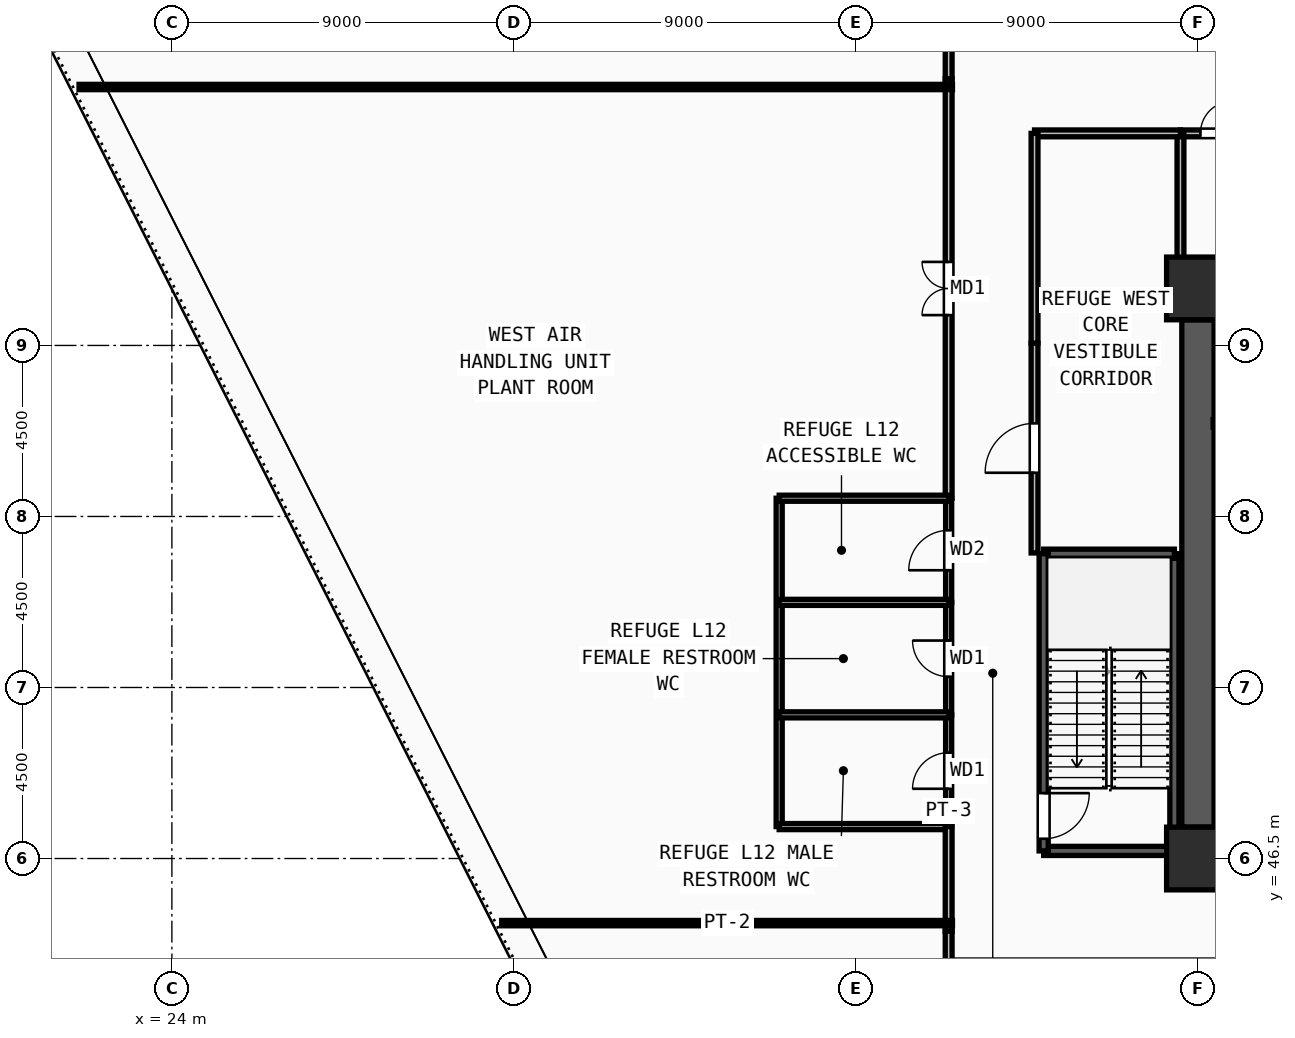
"""IFC4 building model, lengths in metres.
Left out: names, types, materials, properties, quantities, classifications, styles, units other than length and angle.
Written with IfcOpenShell. Run it as: python <this file> out.ifc"""

import sys

from ifc_helpers import new_model, si_unit, direction, frame, frame_2d, origin, origin_2d, place, context, subcontext, project, spatial, rectangle, extrude, source, transform, mapped, element, fill, save


model = new_model("IFC4")
c1 = context("Model", 3, precision=1e-05, world=origin(), true_north=direction((0.0, 1.0)))
c2 = subcontext(c1, "Body", "Model", "MODEL_VIEW")
j1 = project(units=[si_unit("LENGTHUNIT", "METRE"), si_unit("PLANEANGLEUNIT", "RADIAN")], contexts=[c1])
p1 = place(None, origin())
s1 = spatial("IfcSite", under=j1, at=p1, CompositionType="ELEMENT")
p2 = place(p1, origin())
s2 = spatial("IfcBuilding", under=s1, at=p2, CompositionType="ELEMENT")
p3 = place(p2, frame((0.0, 0.0, 47.25)))
s3 = spatial("IfcBuildingStorey", under=s2, at=p3, CompositionType="ELEMENT", Elevation=47.25)
m1 = source(origin(), c2, "Body", "SweptSolid", [
    extrude(rectangle(XDim=1.65, YDim=1.65, at=origin_2d()), origin(), (0.0, 0.0, 1.0), 4.5),
])
for number, where, z_axis, x_axis in (
    (1, (51.0, 46.5, 0.0), (0.0, 0.0, 1.0), (1.0, 0.0, 0.0)),
    (2, (51.0, 61.5, 0.0), (0.0, 0.0, 1.0), (1.0, 0.0, 0.0)),
):
    element("IfcColumn", number, at=place(p3, frame(where, z_axis=z_axis, x_axis=x_axis)), inside=s3, PredefinedType="COLUMN", context=c2, shape_type="MappedRepresentation", body=[
        mapped(m1, transform((0.0, 0.0, 0.0), x_axis=(1.0, 0.0, 0.0), y_axis=(0.0, 1.0, 0.0), z_axis=(0.0, 0.0, 1.0), scale=1.0)),
    ])
p4 = place(p3, frame((51.0, 47.325, 0.0), z_axis=(0.0, 0.0, 1.0), x_axis=(0.0, 1.0, 0.0)))
e3 = element("IfcWall", 3, at=p4, inside=s3, PredefinedType="SHEAR", context=c2, shape_type="SweptSolid", body=[
    extrude(rectangle(XDim=13.35, YDim=0.85, at=frame_2d((6.675, 0.0))), origin(), (0.0, 0.0, 1.0), 4.32),
])
p5 = place(p3, frame((46.94, 46.7, 0.0), z_axis=(0.0, 0.0, 1.0), x_axis=(1.0, 0.0, 0.0)))
e4 = element("IfcWall", 4, at=p5, inside=s3, PredefinedType="SOLIDWALL", context=c2, shape_type="SweptSolid", body=[
    extrude(rectangle(XDim=3.44, YDim=0.24, at=frame_2d((1.72, 0.0))), origin(), (0.0, 0.0, 1.0), 4.32),
])
p6 = place(p3, frame((50.38, 46.7, 0.0), z_axis=(0.0, 0.0, 1.0), x_axis=(0.0, 1.0, 0.0)))
e5 = element("IfcWall", 5, at=p6, inside=s3, PredefinedType="SOLIDWALL", context=c2, shape_type="SweptSolid", body=[
    extrude(rectangle(XDim=7.82, YDim=0.24, at=frame_2d((3.91, 0.0))), origin(), (0.0, 0.0, 1.0), 4.32),
])
p7 = place(p3, frame((50.38, 54.52, 0.0), z_axis=(0.0, 0.0, 1.0), x_axis=(-1.0, 0.0, 0.0)))
e6 = element("IfcWall", 6, at=p7, inside=s3, PredefinedType="SOLIDWALL", context=c2, shape_type="SweptSolid", body=[
    extrude(rectangle(XDim=3.44, YDim=0.24, at=frame_2d((1.72, 0.0))), origin(), (0.0, 0.0, 1.0), 4.32),
])
p8 = place(p3, frame((46.94, 54.52, 0.0), z_axis=(0.0, 0.0, 1.0), x_axis=(0.0, -1.0, 0.0)))
e7 = element("IfcWall", 7, at=p8, inside=s3, PredefinedType="SOLIDWALL", context=c2, shape_type="SweptSolid", body=[
    extrude(rectangle(XDim=7.82, YDim=0.24, at=frame_2d((3.91, 0.0))), origin(), (0.0, 0.0, 1.0), 4.32),
])
m2 = source(origin(), c2, "Body", "SweptSolid", [
    extrude(rectangle(XDim=1.2, YDim=2.2, at=frame_2d((0.6, 1.1))), frame((0.0, 0.13, 0.0), z_axis=(0.0, -1.0, 0.0), x_axis=(1.0, 0.0, 0.0)), (0.0, 0.0, 1.0), 0.26),
])
p9 = place(p8, frame((6.3, 0.0, 0.0)))
e8 = element("IfcOpeningElement", 8, at=p9, cuts=e7, PredefinedType="OPENING", context=c2, shape_type="MappedRepresentation", body=[
    mapped(m2, transform((0.0, 0.0, 0.0), x_axis=(1.0, 0.0, 0.0), y_axis=(0.0, 1.0, 0.0), z_axis=(0.0, 0.0, 1.0), scale=1.0)),
])
for number, where, z_axis, x_axis in (
    (9, (51.4, 57.95, 0.0), (0.0, 0.0, 1.0), (1.0, 0.0, 0.0)),
    (10, (53.8, 60.88, 0.0), (0.0, 0.0, 1.0), (-1.0, 0.0, 0.0)),
):
    element("IfcWall", number, at=place(p3, frame(where, z_axis=z_axis, x_axis=x_axis)), inside=s3, PredefinedType="SOLIDWALL", context=c2, shape_type="SweptSolid", body=[
        extrude(rectangle(XDim=2.4, YDim=0.2, at=frame_2d((1.2, 0.0))), origin(), (0.0, 0.0, 1.0), 4.32),
    ])
p10 = place(p3, frame((44.44, 47.34, 0.0), z_axis=(0.0, 0.0, 1.0), x_axis=(0.0, 1.0, 0.0)))
e11 = element("IfcWall", 11, at=p10, inside=s3, PredefinedType="PARTITIONING", context=c2, shape_type="SweptSolid", body=[
    extrude(rectangle(XDim=2.94, YDim=0.16, at=frame_2d((1.47, 0.0))), origin(), (0.0, 0.0, 1.0), 4.32),
])
m3 = source(origin(), c2, "Body", "SweptSolid", [
    extrude(rectangle(XDim=0.95, YDim=2.15, at=frame_2d((0.475, 1.075))), frame((0.0, 0.09, 0.0), z_axis=(0.0, -1.0, 0.0), x_axis=(1.0, 0.0, 0.0)), (0.0, 0.0, 1.0), 0.18),
])
p11 = place(p10, frame((0.995, 0.0, 0.0)))
e12 = element("IfcOpeningElement", 12, at=p11, cuts=e11, PredefinedType="OPENING", context=c2, shape_type="MappedRepresentation", body=[
    mapped(m3, transform((0.0, 0.0, 0.0), x_axis=(1.0, 0.0, 0.0), y_axis=(0.0, 1.0, 0.0), z_axis=(0.0, 0.0, 1.0), scale=1.0)),
])
p12 = place(p3, frame((44.44, 50.28, 0.0), z_axis=(0.0, 0.0, 1.0), x_axis=(0.0, 1.0, 0.0)))
e13 = element("IfcWall", 13, at=p12, inside=s3, PredefinedType="PARTITIONING", context=c2, shape_type="SweptSolid", body=[
    extrude(rectangle(XDim=2.96, YDim=0.16, at=frame_2d((1.48, 0.0))), origin(), (0.0, 0.0, 1.0), 4.32),
])
p13 = place(p12, frame((1.005, 0.0, 0.0)))
e14 = element("IfcOpeningElement", 14, at=p13, cuts=e13, PredefinedType="OPENING", context=c2, shape_type="MappedRepresentation", body=[
    mapped(m3, transform((0.0, 0.0, 0.0), x_axis=(1.0, 0.0, 0.0), y_axis=(0.0, 1.0, 0.0), z_axis=(0.0, 0.0, 1.0), scale=1.0)),
])
p14 = place(p3, frame((44.44, 53.24, 0.0), z_axis=(0.0, 0.0, 1.0), x_axis=(0.0, 1.0, 0.0)))
e15 = element("IfcWall", 15, at=p14, inside=s3, PredefinedType="PARTITIONING", context=c2, shape_type="SweptSolid", body=[
    extrude(rectangle(XDim=2.74, YDim=0.16, at=frame_2d((1.37, 0.0))), origin(), (0.0, 0.0, 1.0), 4.32),
])
m4 = source(origin(), c2, "Body", "SweptSolid", [
    extrude(rectangle(XDim=1.05, YDim=2.15, at=frame_2d((0.525, 1.075))), frame((0.0, 0.09, 0.0), z_axis=(0.0, -1.0, 0.0), x_axis=(1.0, 0.0, 0.0)), (0.0, 0.0, 1.0), 0.18),
])
p15 = place(p14, frame((0.845, 0.0, 0.0)))
e16 = element("IfcOpeningElement", 16, at=p15, cuts=e15, PredefinedType="OPENING", context=c2, shape_type="MappedRepresentation", body=[
    mapped(m4, transform((0.0, 0.0, 0.0), x_axis=(1.0, 0.0, 0.0), y_axis=(0.0, 1.0, 0.0), z_axis=(0.0, 0.0, 1.0), scale=1.0)),
])
p16 = place(p3, frame((50.54, 65.58, 0.0), z_axis=(0.0, 0.0, 1.0), x_axis=(1.0, 0.0, 0.0)))
e17 = element("IfcWall", 17, at=p16, inside=s3, PredefinedType="PARTITIONING", context=c2, shape_type="SweptSolid", body=[
    extrude(rectangle(XDim=1.9, YDim=0.18, at=frame_2d((0.95, 0.0))), origin(), (0.0, 0.0, 1.0), 4.32),
])
m5 = source(origin(), c2, "Body", "SweptSolid", [
    extrude(rectangle(XDim=0.85, YDim=2.1, at=frame_2d((0.425, 1.05))), frame((0.0, 0.1, 0.0), z_axis=(0.0, -1.0, 0.0), x_axis=(1.0, 0.0, 0.0)), (0.0, 0.0, 1.0), 0.2),
])
p17 = place(p16, frame((0.525, 0.0, 0.0)))
e18 = element("IfcOpeningElement", 18, at=p17, cuts=e17, PredefinedType="OPENING", context=c2, shape_type="MappedRepresentation", body=[
    mapped(m5, transform((0.0, 0.0, 0.0), x_axis=(1.0, 0.0, 0.0), y_axis=(0.0, 1.0, 0.0), z_axis=(0.0, 0.0, 1.0), scale=1.0)),
])
p18 = place(p3, frame((46.7, 54.54, 0.0), z_axis=(0.0, 0.0, 1.0), x_axis=(0.0, 1.0, 0.0)))
e19 = element("IfcWall", 19, at=p18, inside=s3, PredefinedType="PARTITIONING", context=c2, shape_type="SweptSolid", body=[
    extrude(rectangle(XDim=5.52, YDim=0.18, at=frame_2d((2.76, 0.0))), origin(), (0.0, 0.0, 1.0), 4.32),
])
m6 = source(origin(), c2, "Body", "SweptSolid", [
    extrude(rectangle(XDim=1.3, YDim=2.2, at=frame_2d((0.65, 1.1))), frame((0.0, 0.1, 0.0), z_axis=(0.0, -1.0, 0.0), x_axis=(1.0, 0.0, 0.0)), (0.0, 0.0, 1.0), 0.2),
])
p19 = place(p18, frame((2.11, 0.0, 0.0)))
e20 = element("IfcOpeningElement", 20, at=p19, cuts=e19, PredefinedType="OPENING", context=c2, shape_type="MappedRepresentation", body=[
    mapped(m6, transform((0.0, 0.0, 0.0), x_axis=(1.0, 0.0, 0.0), y_axis=(0.0, 1.0, 0.0), z_axis=(0.0, 0.0, 1.0), scale=1.0)),
])
p20 = place(p3, frame((44.44, 55.98, 0.0), z_axis=(0.0, 0.0, 1.0), x_axis=(0.0, 1.0, 0.0)))
e21 = element("IfcWall", 21, at=p20, inside=s3, PredefinedType="PARTITIONING", context=c2, shape_type="SweptSolid", body=[
    extrude(rectangle(XDim=11.035, YDim=0.18, at=frame_2d((5.518, 0.0))), origin(), (0.0, 0.0, 1.0), 4.32),
])
m7 = source(origin(), c2, "Body", "SweptSolid", [
    extrude(rectangle(XDim=1.4, YDim=2.25, at=frame_2d((0.7, 1.125))), frame((0.0, 0.1, 0.0), z_axis=(0.0, -1.0, 0.0), x_axis=(1.0, 0.0, 0.0)), (0.0, 0.0, 1.0), 0.2),
])
p21 = place(p20, frame((4.818, 0.0, 0.0)))
e22 = element("IfcOpeningElement", 22, at=p21, cuts=e21, PredefinedType="OPENING", context=c2, shape_type="MappedRepresentation", body=[
    mapped(m7, transform((0.0, 0.0, 0.0), x_axis=(1.0, 0.0, 0.0), y_axis=(0.0, 1.0, 0.0), z_axis=(0.0, 0.0, 1.0), scale=1.0)),
])
p22 = place(p3, frame((39.98, 47.34, 0.0), z_axis=(0.0, 0.0, 1.0), x_axis=(0.0, 1.0, 0.0)))
e23 = element("IfcWall", 23, at=p22, inside=s3, PredefinedType="PARTITIONING", context=c2, shape_type="SweptSolid", body=[
    extrude(rectangle(XDim=8.64, YDim=0.16, at=frame_2d((4.32, 0.0))), origin(), (0.0, 0.0, 1.0), 4.32),
])
for number, where, z_axis, x_axis in (
    (24, (39.98, 47.34, 0.0), (0.0, 0.0, 1.0), (1.0, 0.0, 0.0)),
    (25, (39.98, 50.28, 0.0), (0.0, 0.0, 1.0), (1.0, 0.0, 0.0)),
    (26, (39.98, 53.24, 0.0), (0.0, 0.0, 1.0), (1.0, 0.0, 0.0)),
    (27, (39.98, 55.98, 0.0), (0.0, 0.0, 1.0), (1.0, 0.0, 0.0)),
):
    element("IfcWall", number, at=place(p3, frame(where, z_axis=z_axis, x_axis=x_axis)), inside=s3, PredefinedType="PARTITIONING", context=c2, shape_type="SweptSolid", body=[
        extrude(rectangle(XDim=4.46, YDim=0.16, at=frame_2d((2.23, 0.0))), origin(), (0.0, 0.0, 1.0), 4.32),
    ])
p23 = place(p3, frame((50.54, 61.95, 0.0), z_axis=(0.0, 0.0, 1.0), x_axis=(0.0, 1.0, 0.0)))
e28 = element("IfcWall", 28, at=p23, inside=s3, PredefinedType="PARTITIONING", context=c2, shape_type="SweptSolid", body=[
    extrude(rectangle(XDim=3.63, YDim=0.18, at=frame_2d((1.815, 0.0))), origin(), (0.0, 0.0, 1.0), 4.32),
])
p24 = place(p3, frame((46.7, 65.58, 0.0), z_axis=(0.0, 0.0, 1.0), x_axis=(1.0, 0.0, 0.0)))
e29 = element("IfcWall", 29, at=p24, inside=s3, PredefinedType="PARTITIONING", context=c2, shape_type="SweptSolid", body=[
    extrude(rectangle(XDim=3.84, YDim=0.18, at=frame_2d((1.92, 0.0))), origin(), (0.0, 0.0, 1.0), 4.32),
])
p25 = place(p3, frame((46.7, 60.06, 0.0), z_axis=(0.0, 0.0, 1.0), x_axis=(0.0, 1.0, 0.0)))
e30 = element("IfcWall", 30, at=p25, inside=s3, PredefinedType="PARTITIONING", context=c2, shape_type="SweptSolid", body=[
    extrude(rectangle(XDim=5.52, YDim=0.18, at=frame_2d((2.76, 0.0))), origin(), (0.0, 0.0, 1.0), 4.32),
])
p26 = place(p3, frame((44.44, 67.015, 0.0), z_axis=(0.0, 0.0, 1.0), x_axis=(0.0, 1.0, 0.0)))
e31 = element("IfcWall", 31, at=p26, inside=s3, PredefinedType="PARTITIONING", context=c2, shape_type="SweptSolid", body=[
    extrude(rectangle(XDim=0.965, YDim=0.18, at=frame_2d((0.482, 0.0))), origin(), (0.0, 0.0, 1.0), 4.32),
])
p27 = place(p3, frame((44.44, 44.585, 0.0), z_axis=(0.0, 0.0, 1.0), x_axis=(0.0, 1.0, 0.0)))
e32 = element("IfcWall", 32, at=p27, inside=s3, PredefinedType="PARTITIONING", context=c2, shape_type="SweptSolid", body=[
    extrude(rectangle(XDim=2.755, YDim=0.18, at=frame_2d((1.377, 0.0))), origin(), (0.0, 0.0, 1.0), 4.32),
])
p28 = place(p3, frame((44.44, 43.67, 0.0), z_axis=(0.0, 0.0, 1.0), x_axis=(0.0, 1.0, 0.0)))
e33 = element("IfcWall", 33, at=p28, inside=s3, PredefinedType="PARTITIONING", context=c2, shape_type="SweptSolid", body=[
    extrude(rectangle(XDim=0.915, YDim=0.18, at=frame_2d((0.458, 0.0))), origin(), (0.0, 0.0, 1.0), 4.32),
])
p29 = place(p3, frame((44.54, 44.8, 0.0), z_axis=(0.0, 0.0, 1.0), x_axis=(-1.0, 0.0, 0.0)))
e34 = element("IfcWall", 34, at=p29, inside=s3, PredefinedType="PARTITIONING", context=c2, shape_type="SweptSolid", body=[
    extrude(rectangle(XDim=11.861, YDim=0.14, at=frame_2d((5.931, 0.0))), origin(), (0.0, 0.0, 1.0), 4.32),
])
p30 = place(p3, frame((44.54, 66.8, 0.0), z_axis=(0.0, 0.0, 1.0), x_axis=(-1.0, 0.0, 0.0)))
e35 = element("IfcWall", 35, at=p30, inside=s3, PredefinedType="PARTITIONING", context=c2, shape_type="SweptSolid", body=[
    extrude(rectangle(XDim=22.983, YDim=0.14, at=frame_2d((11.492, 0.0))), origin(), (0.0, 0.0, 1.0), 3.405),
])
m8 = source(origin(), c2, "Body", "SweptSolid", [
    extrude(rectangle(XDim=1.2, YDim=2.2, at=frame_2d((0.6, 1.1))), frame((0.0, 0.025, 0.0), z_axis=(0.0, -1.0, 0.0), x_axis=(1.0, 0.0, 0.0)), (0.0, 0.0, 1.0), 0.05),
])
p31 = place(p9, origin())
e36 = element("IfcDoor", 36, at=p31, inside=s3, OperationType="SINGLE_SWING_LEFT", PredefinedType="DOOR", context=c2, shape_type="MappedRepresentation", body=[
    mapped(m8, transform((0.0, 0.0, 0.0), x_axis=(1.0, 0.0, 0.0), y_axis=(0.0, 1.0, 0.0), z_axis=(0.0, 0.0, 1.0), scale=1.0)),
])
fill(e8, e36)
m9 = source(origin(), c2, "Body", "SweptSolid", [
    extrude(rectangle(XDim=0.95, YDim=2.15, at=frame_2d((0.475, 1.075))), frame((0.0, 0.025, 0.0), z_axis=(0.0, -1.0, 0.0), x_axis=(1.0, 0.0, 0.0)), (0.0, 0.0, 1.0), 0.05),
])
p32 = place(p11, origin())
e37 = element("IfcDoor", 37, at=p32, inside=s3, OperationType="SINGLE_SWING_LEFT", PredefinedType="DOOR", context=c2, shape_type="MappedRepresentation", body=[
    mapped(m9, transform((0.0, 0.0, 0.0), x_axis=(1.0, 0.0, 0.0), y_axis=(0.0, 1.0, 0.0), z_axis=(0.0, 0.0, 1.0), scale=1.0)),
])
fill(e12, e37)
p33 = place(p13, origin())
e38 = element("IfcDoor", 38, at=p33, inside=s3, OperationType="SINGLE_SWING_RIGHT", PredefinedType="DOOR", context=c2, shape_type="MappedRepresentation", body=[
    mapped(m9, transform((0.0, 0.0, 0.0), x_axis=(1.0, 0.0, 0.0), y_axis=(0.0, 1.0, 0.0), z_axis=(0.0, 0.0, 1.0), scale=1.0)),
])
fill(e14, e38)
m10 = source(origin(), c2, "Body", "SweptSolid", [
    extrude(rectangle(XDim=1.05, YDim=2.15, at=frame_2d((0.525, 1.075))), frame((0.0, 0.025, 0.0), z_axis=(0.0, -1.0, 0.0), x_axis=(1.0, 0.0, 0.0)), (0.0, 0.0, 1.0), 0.05),
])
p34 = place(p15, origin())
e39 = element("IfcDoor", 39, at=p34, inside=s3, OperationType="SINGLE_SWING_LEFT", PredefinedType="DOOR", context=c2, shape_type="MappedRepresentation", body=[
    mapped(m10, transform((0.0, 0.0, 0.0), x_axis=(1.0, 0.0, 0.0), y_axis=(0.0, 1.0, 0.0), z_axis=(0.0, 0.0, 1.0), scale=1.0)),
])
fill(e16, e39)
m11 = source(origin(), c2, "Body", "SweptSolid", [
    extrude(rectangle(XDim=0.85, YDim=2.1, at=frame_2d((0.425, 1.05))), frame((0.0, 0.025, 0.0), z_axis=(0.0, -1.0, 0.0), x_axis=(1.0, 0.0, 0.0)), (0.0, 0.0, 1.0), 0.05),
])
p35 = place(p17, origin())
e40 = element("IfcDoor", 40, at=p35, inside=s3, OperationType="SINGLE_SWING_RIGHT", PredefinedType="DOOR", context=c2, shape_type="MappedRepresentation", body=[
    mapped(m11, transform((0.0, 0.0, 0.0), x_axis=(1.0, 0.0, 0.0), y_axis=(0.0, 1.0, 0.0), z_axis=(0.0, 0.0, 1.0), scale=1.0)),
])
fill(e18, e40)
m12 = source(origin(), c2, "Body", "SweptSolid", [
    extrude(rectangle(XDim=1.3, YDim=2.2, at=frame_2d((0.65, 1.1))), frame((0.0, 0.025, 0.0), z_axis=(0.0, -1.0, 0.0), x_axis=(1.0, 0.0, 0.0)), (0.0, 0.0, 1.0), 0.05),
])
p36 = place(p19, origin())
e41 = element("IfcDoor", 41, at=p36, inside=s3, OperationType="SINGLE_SWING_LEFT", PredefinedType="DOOR", context=c2, shape_type="MappedRepresentation", body=[
    mapped(m12, transform((0.0, 0.0, 0.0), x_axis=(1.0, 0.0, 0.0), y_axis=(0.0, 1.0, 0.0), z_axis=(0.0, 0.0, 1.0), scale=1.0)),
])
fill(e20, e41)
m13 = source(origin(), c2, "Body", "SweptSolid", [
    extrude(rectangle(XDim=1.4, YDim=2.25, at=frame_2d((0.7, 1.125))), frame((0.0, 0.025, 0.0), z_axis=(0.0, -1.0, 0.0), x_axis=(1.0, 0.0, 0.0)), (0.0, 0.0, 1.0), 0.05),
])
p37 = place(p21, origin())
e42 = element("IfcDoor", 42, at=p37, inside=s3, OperationType="DOUBLE_DOOR_SINGLE_SWING", PredefinedType="DOOR", context=c2, shape_type="MappedRepresentation", body=[
    mapped(m13, transform((0.0, 0.0, 0.0), x_axis=(1.0, 0.0, 0.0), y_axis=(0.0, 1.0, 0.0), z_axis=(0.0, 0.0, 1.0), scale=1.0)),
])
fill(e22, e42)
save(model, sys.argv[1])
